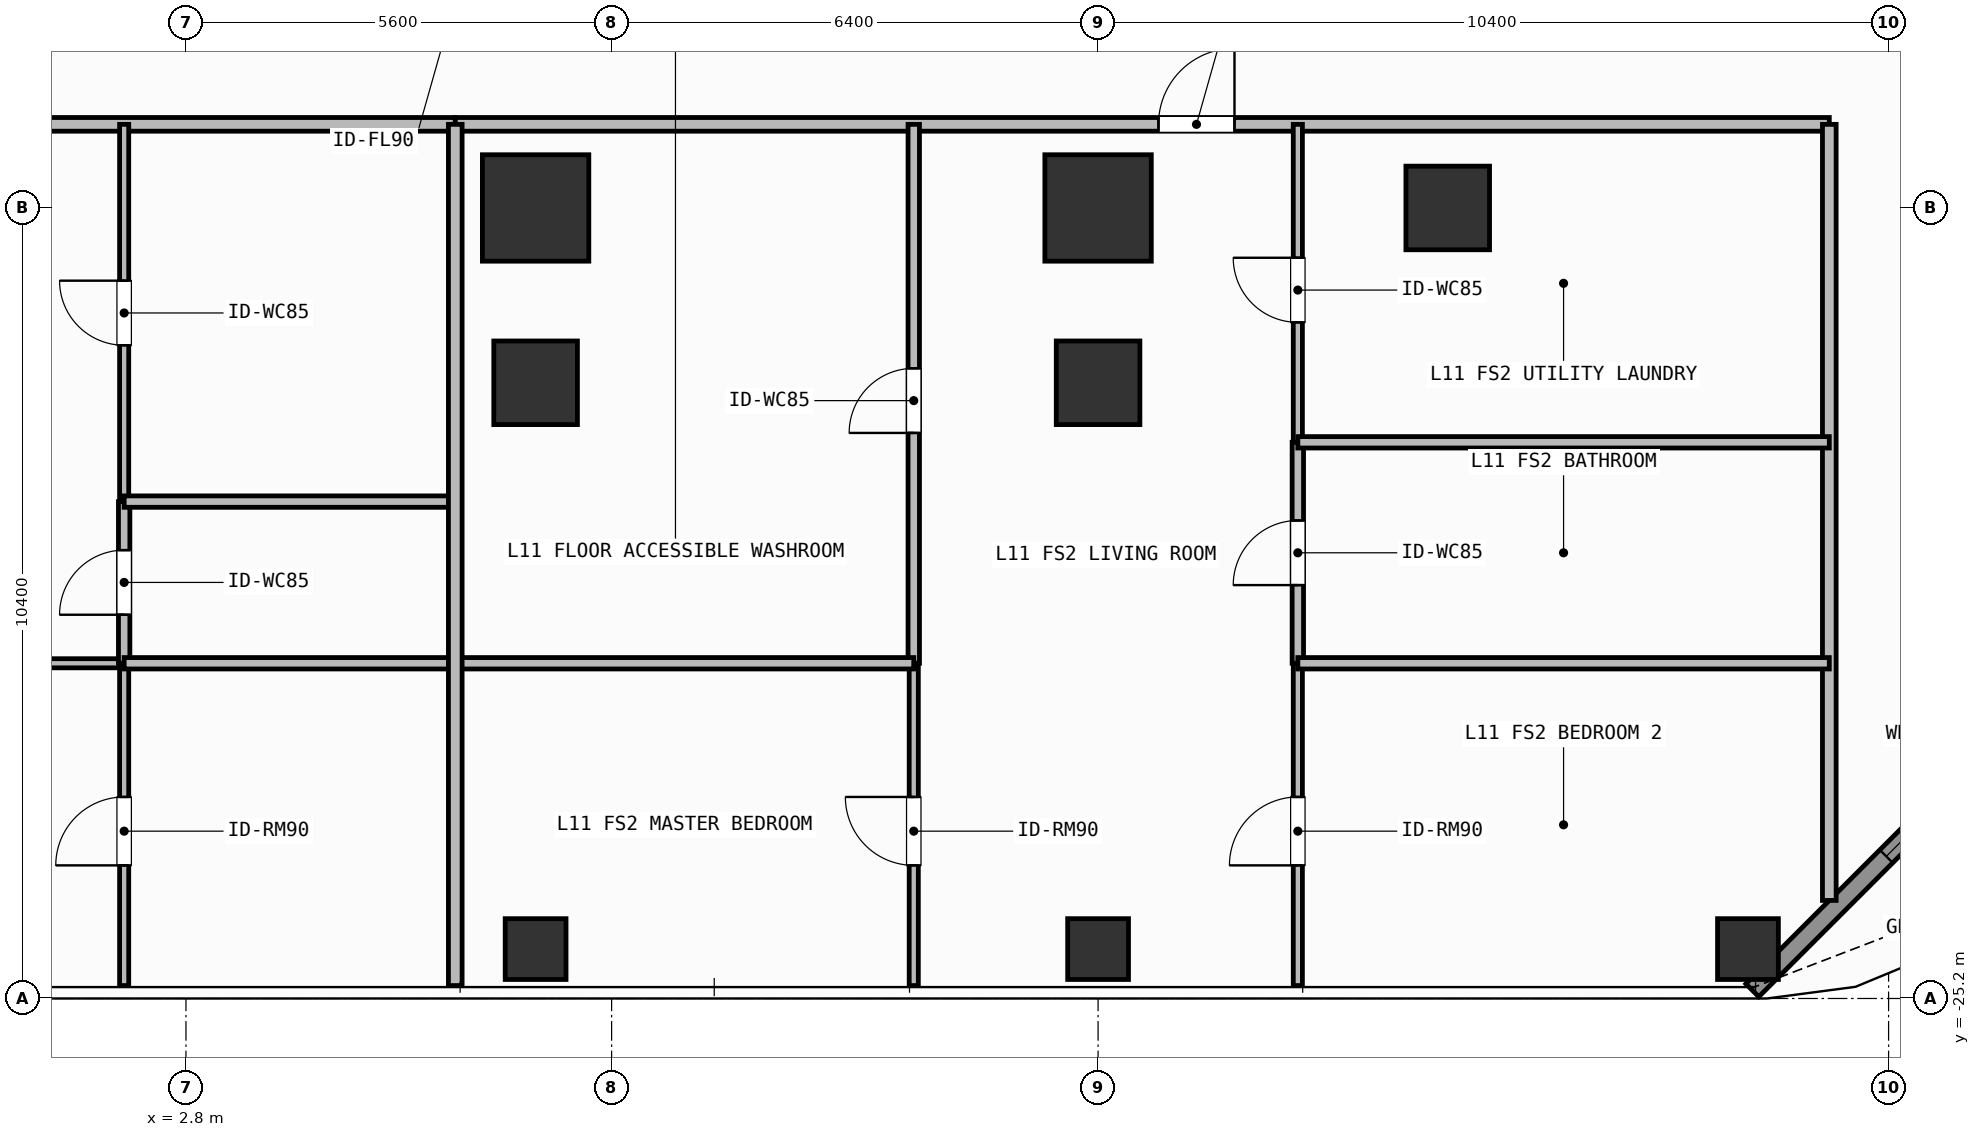
"""IFC4 building model, lengths in metres.
Left out: names, types, materials, properties, quantities, classifications, styles, units other than length and angle.
Written with IfcOpenShell. Run it as: python <this file> out.ifc"""

import sys

from ifc_helpers import new_model, si_unit, direction, frame, frame_2d, origin, origin_2d, place, context, subcontext, project, spatial, rectangle, hollow_rectangle, extrude, element, fill, save


model = new_model("IFC4")
c1 = context("Model", 3, precision=1e-05, world=origin(), true_north=direction((0.0, 1.0)))
c2 = subcontext(c1, "Body", "Model", "MODEL_VIEW")
j1 = project(units=[si_unit("LENGTHUNIT", "METRE"), si_unit("PLANEANGLEUNIT", "RADIAN")], contexts=[c1])
p1 = place(None, origin())
s1 = spatial("IfcSite", under=j1, at=p1, CompositionType="ELEMENT")
p2 = place(p1, origin())
s2 = spatial("IfcBuilding", under=s1, at=p2, CompositionType="ELEMENT")
p3 = place(p2, frame((0.0, 0.0, 42.3)))
s3 = spatial("IfcBuildingStorey", under=s2, at=p3, CompositionType="ELEMENT", Elevation=42.3)
for number, where, z_axis, x_axis in (
    (1, (7.4, -14.8, 0.0), (0.0, 0.0, 1.0), (1.0, 0.0, 0.0)),
    (2, (14.8, -14.8, 0.0), (0.0, 0.0, 1.0), (1.0, 0.0, 0.0)),
):
    element("IfcColumn", number, at=place(p3, frame(where, z_axis=z_axis, x_axis=x_axis)), inside=s3, PredefinedType="COLUMN", context=c2, shape_type="SweptSolid", body=[
        extrude(rectangle(XDim=1.4, YDim=1.4, at=origin_2d()), origin(), (0.0, 0.0, 1.0), 3.9),
    ])
for number, where, z_axis, x_axis in (
    (3, (19.4, -14.8, 0.0), (0.0, 0.0, 1.0), (1.0, 0.0, 0.0)),
    (4, (7.4, -17.1, 0.0), (0.0, 0.0, 1.0), (1.0, 0.0, 0.0)),
    (5, (14.8, -17.1, 0.0), (0.0, 0.0, 1.0), (1.0, 0.0, 0.0)),
):
    element("IfcColumn", number, at=place(p3, frame(where, z_axis=z_axis, x_axis=x_axis)), inside=s3, PredefinedType="COLUMN", context=c2, shape_type="SweptSolid", body=[
        extrude(rectangle(XDim=1.1, YDim=1.1, at=origin_2d()), origin(), (0.0, 0.0, 1.0), 3.9),
    ])
for number, where, z_axis, x_axis in (
    (6, (23.35, -24.55, 0.0), (0.0, 0.0, 1.0), (1.0, 0.0, 0.0)),
    (7, (7.4, -24.55, 0.0), (0.0, 0.0, 1.0), (1.0, 0.0, 0.0)),
    (8, (14.8, -24.55, 0.0), (0.0, 0.0, 1.0), (1.0, 0.0, 0.0)),
):
    element("IfcColumn", number, at=place(p3, frame(where, z_axis=z_axis, x_axis=x_axis)), inside=s3, PredefinedType="COLUMN", context=c2, shape_type="SweptSolid", body=[
        extrude(hollow_rectangle(XDim=0.8, YDim=0.8, WallThickness=0.036, at=origin_2d()), origin(), (0.0, 0.0, 1.0), 3.9),
    ])
p4 = place(p3, frame((27.992, -20.508, 0.0), z_axis=(0.0, 0.0, 1.0), x_axis=(-0.707106781187, -0.707106781187, 0.0)))
e9 = element("IfcWall", 9, at=p4, inside=s3, PredefinedType="SOLIDWALL", context=c2, shape_type="SweptSolid", body=[
    extrude(rectangle(XDim=6.484, YDim=0.24, at=frame_2d((3.242, 0.0))), origin(), (0.0, 0.0, 1.0), 3.68),
])
p5 = place(p4, frame((2.492, 0.0, 0.8)))
e10 = element("IfcOpeningElement", 10, at=p5, cuts=e9, PredefinedType="OPENING", context=c2, shape_type="SweptSolid", body=[
    extrude(rectangle(XDim=1.5, YDim=1.85, at=frame_2d((0.75, 0.925))), frame((0.0, 0.13, 0.0), z_axis=(0.0, -1.0, 0.0), x_axis=(1.0, 0.0, 0.0)), (0.0, 0.0, 1.0), 0.26),
])
p6 = place(p3, frame((-18.62, -13.7, 0.0), z_axis=(0.0, 0.0, 1.0), x_axis=(1.0, 0.0, 0.0)))
e11 = element("IfcWall", 11, at=p6, inside=s3, PredefinedType="PARTITIONING", context=c2, shape_type="SweptSolid", body=[
    extrude(rectangle(XDim=24.963, YDim=0.18, at=frame_2d((12.481, 0.0))), origin(), (0.0, 0.0, 1.0), 3.68),
])
p7 = place(p6, frame((11.981, 0.0, 0.0)))
e12 = element("IfcOpeningElement", 12, at=p7, cuts=e11, PredefinedType="OPENING", context=c2, shape_type="SweptSolid", body=[
    extrude(rectangle(XDim=1.0, YDim=2.2, at=frame_2d((0.5, 1.1))), frame((0.0, 0.1, 0.0), z_axis=(0.0, -1.0, 0.0), x_axis=(1.0, 0.0, 0.0)), (0.0, 0.0, 1.0), 0.2),
])
p8 = place(p3, frame((-5.425, -20.79, 0.0), z_axis=(0.0, 0.0, 1.0), x_axis=(1.0, 0.0, 0.0)))
e13 = element("IfcWall", 13, at=p8, inside=s3, PredefinedType="PARTITIONING", context=c2, shape_type="SweptSolid", body=[
    extrude(rectangle(XDim=7.412, YDim=0.12, at=frame_2d((3.706, 0.0))), origin(), (0.0, 0.0, 1.0), 3.68),
])
p9 = place(p8, frame((3.344, 0.0, 0.0)))
e14 = element("IfcOpeningElement", 14, at=p9, cuts=e13, PredefinedType="OPENING", context=c2, shape_type="SweptSolid", body=[
    extrude(rectangle(XDim=0.9, YDim=2.1, at=frame_2d((0.45, 1.05))), frame((0.0, 0.07, 0.0), z_axis=(0.0, -1.0, 0.0), x_axis=(1.0, 0.0, 0.0)), (0.0, 0.0, 1.0), 0.14),
])
p10 = place(p3, frame((1.987, -20.79, 0.0), z_axis=(0.0, 0.0, 1.0), x_axis=(0.0, 1.0, 0.0)))
e15 = element("IfcWall", 15, at=p10, inside=s3, PredefinedType="PARTITIONING", context=c2, shape_type="SweptSolid", body=[
    extrude(rectangle(XDim=2.127, YDim=0.15, at=frame_2d((1.063, 0.0))), origin(), (0.0, 0.0, 1.0), 3.68),
])
p11 = place(p10, frame((0.638, 0.0, 0.0)))
e16 = element("IfcOpeningElement", 16, at=p11, cuts=e15, PredefinedType="OPENING", context=c2, shape_type="SweptSolid", body=[
    extrude(rectangle(XDim=0.85, YDim=2.1, at=frame_2d((0.425, 1.05))), frame((0.0, 0.085, 0.0), z_axis=(0.0, -1.0, 0.0), x_axis=(1.0, 0.0, 0.0)), (0.0, 0.0, 1.0), 0.17),
])
p12 = place(p3, frame((1.987, -18.663, 0.0), z_axis=(0.0, 0.0, 1.0), x_axis=(0.0, 1.0, 0.0)))
e17 = element("IfcWall", 17, at=p12, inside=s3, PredefinedType="PARTITIONING", context=c2, shape_type="SweptSolid", body=[
    extrude(rectangle(XDim=4.963, YDim=0.12, at=frame_2d((2.481, 0.0))), origin(), (0.0, 0.0, 1.0), 3.68),
])
p13 = place(p12, frame((2.056, 0.0, 0.0)))
e18 = element("IfcOpeningElement", 18, at=p13, cuts=e17, PredefinedType="OPENING", context=c2, shape_type="SweptSolid", body=[
    extrude(rectangle(XDim=0.85, YDim=2.1, at=frame_2d((0.425, 1.05))), frame((0.0, 0.07, 0.0), z_axis=(0.0, -1.0, 0.0), x_axis=(1.0, 0.0, 0.0)), (0.0, 0.0, 1.0), 0.14),
])
p14 = place(p3, frame((1.987, -25.03, 0.0), z_axis=(0.0, 0.0, 1.0), x_axis=(0.0, 1.0, 0.0)))
e19 = element("IfcWall", 19, at=p14, inside=s3, PredefinedType="PARTITIONING", context=c2, shape_type="SweptSolid", body=[
    extrude(rectangle(XDim=4.24, YDim=0.12, at=frame_2d((2.12, 0.0))), origin(), (0.0, 0.0, 1.0), 3.68),
])
p15 = place(p14, frame((1.581, 0.0, 0.0)))
e20 = element("IfcOpeningElement", 20, at=p15, cuts=e19, PredefinedType="OPENING", context=c2, shape_type="SweptSolid", body=[
    extrude(rectangle(XDim=0.9, YDim=2.1, at=frame_2d((0.45, 1.05))), frame((0.0, 0.07, 0.0), z_axis=(0.0, -1.0, 0.0), x_axis=(1.0, 0.0, 0.0)), (0.0, 0.0, 1.0), 0.14),
])
p16 = place(p3, frame((6.343, -13.7, 0.0), z_axis=(0.0, 0.0, 1.0), x_axis=(1.0, 0.0, 0.0)))
e21 = element("IfcWall", 21, at=p16, inside=s3, PredefinedType="PARTITIONING", context=c2, shape_type="SweptSolid", body=[
    extrude(rectangle(XDim=18.077, YDim=0.18, at=frame_2d((9.039, 0.0))), origin(), (0.0, 0.0, 1.0), 3.68),
])
p17 = place(p16, frame((9.252, 0.0, 0.0)))
e22 = element("IfcOpeningElement", 22, at=p17, cuts=e21, PredefinedType="OPENING", context=c2, shape_type="SweptSolid", body=[
    extrude(rectangle(XDim=1.0, YDim=2.2, at=frame_2d((0.5, 1.1))), frame((0.0, 0.1, 0.0), z_axis=(0.0, -1.0, 0.0), x_axis=(1.0, 0.0, 0.0)), (0.0, 0.0, 1.0), 0.2),
])
p18 = place(p3, frame((12.375, -20.79, 0.0), z_axis=(0.0, 0.0, 1.0), x_axis=(0.0, 1.0, 0.0)))
e23 = element("IfcWall", 23, at=p18, inside=s3, PredefinedType="PARTITIONING", context=c2, shape_type="SweptSolid", body=[
    extrude(rectangle(XDim=7.09, YDim=0.15, at=frame_2d((3.545, 0.0))), origin(), (0.0, 0.0, 1.0), 3.68),
])
p19 = place(p18, frame((3.03, 0.0, 0.0)))
e24 = element("IfcOpeningElement", 24, at=p19, cuts=e23, PredefinedType="OPENING", context=c2, shape_type="SweptSolid", body=[
    extrude(rectangle(XDim=0.85, YDim=2.1, at=frame_2d((0.425, 1.05))), frame((0.0, 0.085, 0.0), z_axis=(0.0, -1.0, 0.0), x_axis=(1.0, 0.0, 0.0)), (0.0, 0.0, 1.0), 0.17),
])
p20 = place(p3, frame((12.375, -25.03, 0.0), z_axis=(0.0, 0.0, 1.0), x_axis=(0.0, 1.0, 0.0)))
e25 = element("IfcWall", 25, at=p20, inside=s3, PredefinedType="PARTITIONING", context=c2, shape_type="SweptSolid", body=[
    extrude(rectangle(XDim=4.24, YDim=0.12, at=frame_2d((2.12, 0.0))), origin(), (0.0, 0.0, 1.0), 3.68),
])
p21 = place(p20, frame((1.581, 0.0, 0.0)))
e26 = element("IfcOpeningElement", 26, at=p21, cuts=e25, PredefinedType="OPENING", context=c2, shape_type="SweptSolid", body=[
    extrude(rectangle(XDim=0.9, YDim=2.1, at=frame_2d((0.45, 1.05))), frame((0.0, 0.07, 0.0), z_axis=(0.0, -1.0, 0.0), x_axis=(1.0, 0.0, 0.0)), (0.0, 0.0, 1.0), 0.14),
])
p22 = place(p3, frame((17.428, -20.79, 0.0), z_axis=(0.0, 0.0, 1.0), x_axis=(0.0, 1.0, 0.0)))
e27 = element("IfcWall", 27, at=p22, inside=s3, PredefinedType="PARTITIONING", context=c2, shape_type="SweptSolid", body=[
    extrude(rectangle(XDim=2.907, YDim=0.15, at=frame_2d((1.454, 0.0))), origin(), (0.0, 0.0, 1.0), 3.68),
])
p23 = place(p22, frame((1.029, 0.0, 0.0)))
e28 = element("IfcOpeningElement", 28, at=p23, cuts=e27, PredefinedType="OPENING", context=c2, shape_type="SweptSolid", body=[
    extrude(rectangle(XDim=0.85, YDim=2.1, at=frame_2d((0.425, 1.05))), frame((0.0, 0.085, 0.0), z_axis=(0.0, -1.0, 0.0), x_axis=(1.0, 0.0, 0.0)), (0.0, 0.0, 1.0), 0.17),
])
p24 = place(p3, frame((17.428, -17.883, 0.0), z_axis=(0.0, 0.0, 1.0), x_axis=(0.0, 1.0, 0.0)))
e29 = element("IfcWall", 29, at=p24, inside=s3, PredefinedType="PARTITIONING", context=c2, shape_type="SweptSolid", body=[
    extrude(rectangle(XDim=4.183, YDim=0.12, at=frame_2d((2.092, 0.0))), origin(), (0.0, 0.0, 1.0), 3.68),
])
p25 = place(p24, frame((1.578, 0.0, 0.0)))
e30 = element("IfcOpeningElement", 30, at=p25, cuts=e29, PredefinedType="OPENING", context=c2, shape_type="SweptSolid", body=[
    extrude(rectangle(XDim=0.85, YDim=2.1, at=frame_2d((0.425, 1.05))), frame((0.0, 0.07, 0.0), z_axis=(0.0, -1.0, 0.0), x_axis=(1.0, 0.0, 0.0)), (0.0, 0.0, 1.0), 0.14),
])
p26 = place(p3, frame((17.428, -25.03, 0.0), z_axis=(0.0, 0.0, 1.0), x_axis=(0.0, 1.0, 0.0)))
e31 = element("IfcWall", 31, at=p26, inside=s3, PredefinedType="PARTITIONING", context=c2, shape_type="SweptSolid", body=[
    extrude(rectangle(XDim=4.24, YDim=0.12, at=frame_2d((2.12, 0.0))), origin(), (0.0, 0.0, 1.0), 3.68),
])
p27 = place(p26, frame((1.581, 0.0, 0.0)))
e32 = element("IfcOpeningElement", 32, at=p27, cuts=e31, PredefinedType="OPENING", context=c2, shape_type="SweptSolid", body=[
    extrude(rectangle(XDim=0.9, YDim=2.1, at=frame_2d((0.45, 1.05))), frame((0.0, 0.07, 0.0), z_axis=(0.0, -1.0, 0.0), x_axis=(1.0, 0.0, 0.0)), (0.0, 0.0, 1.0), 0.14),
])
p28 = place(p3, frame((24.42, -23.91, 0.0), z_axis=(0.0, 0.0, 1.0), x_axis=(0.0, 1.0, 0.0)))
e33 = element("IfcWall", 33, at=p28, inside=s3, PredefinedType="PARTITIONING", context=c2, shape_type="SweptSolid", body=[
    extrude(rectangle(XDim=10.21, YDim=0.18, at=frame_2d((5.105, 0.0))), origin(), (0.0, 0.0, 1.0), 3.68),
])
for number, where, z_axis, x_axis in (
    (34, (1.987, -18.663, 0.0), (0.0, 0.0, 1.0), (1.0, 0.0, 0.0)),
    (35, (1.987, -20.79, 0.0), (0.0, 0.0, 1.0), (1.0, 0.0, 0.0)),
):
    element("IfcWall", number, at=place(p3, frame(where, z_axis=z_axis, x_axis=x_axis)), inside=s3, PredefinedType="PARTITIONING", context=c2, shape_type="SweptSolid", body=[
        extrude(rectangle(XDim=4.356, YDim=0.15, at=frame_2d((2.178, 0.0))), origin(), (0.0, 0.0, 1.0), 3.68),
    ])
p29 = place(p3, frame((6.343, -20.79, 0.0), z_axis=(0.0, 0.0, 1.0), x_axis=(1.0, 0.0, 0.0)))
e36 = element("IfcWall", 36, at=p29, inside=s3, PredefinedType="PARTITIONING", context=c2, shape_type="SweptSolid", body=[
    extrude(rectangle(XDim=6.032, YDim=0.15, at=frame_2d((3.016, 0.0))), origin(), (0.0, 0.0, 1.0), 3.68),
])
for number, where, z_axis, x_axis in (
    (37, (17.428, -17.883, 0.0), (0.0, 0.0, 1.0), (1.0, 0.0, 0.0)),
    (38, (17.428, -20.79, 0.0), (0.0, 0.0, 1.0), (1.0, 0.0, 0.0)),
):
    element("IfcWall", number, at=place(p3, frame(where, z_axis=z_axis, x_axis=x_axis)), inside=s3, PredefinedType="PARTITIONING", context=c2, shape_type="SweptSolid", body=[
        extrude(rectangle(XDim=6.992, YDim=0.15, at=frame_2d((3.496, 0.0))), origin(), (0.0, 0.0, 1.0), 3.68),
    ])
p30 = place(p3, frame((6.343, -25.03, 0.0), z_axis=(0.0, 0.0, 1.0), x_axis=(0.0, 1.0, 0.0)))
e39 = element("IfcWall", 39, at=p30, inside=s3, PredefinedType="PARTITIONING", context=c2, shape_type="SweptSolid", body=[
    extrude(rectangle(XDim=11.33, YDim=0.18, at=frame_2d((5.665, 0.0))), origin(), (0.0, 0.0, 1.0), 3.68),
])
p31 = place(p5, origin())
e40 = element("IfcWindow", 40, at=p31, inside=s3, PartitioningType="SINGLE_PANEL", PredefinedType="WINDOW", context=c2, shape_type="SweptSolid", body=[
    extrude(rectangle(XDim=1.5, YDim=1.85, at=frame_2d((0.75, 0.925))), frame((0.0, 0.03, 0.0), z_axis=(0.0, -1.0, 0.0), x_axis=(1.0, 0.0, 0.0)), (0.0, 0.0, 1.0), 0.06),
])
fill(e10, e40)
p32 = place(p11, origin())
e41 = element("IfcDoor", 41, at=p32, inside=s3, OperationType="SINGLE_SWING_LEFT", PredefinedType="DOOR", context=c2, shape_type="SweptSolid", body=[
    extrude(rectangle(XDim=0.85, YDim=2.1, at=frame_2d((0.425, 1.05))), frame((0.0, 0.025, 0.0), z_axis=(0.0, -1.0, 0.0), x_axis=(1.0, 0.0, 0.0)), (0.0, 0.0, 1.0), 0.05),
])
fill(e16, e41)
p33 = place(p13, origin())
e42 = element("IfcDoor", 42, at=p33, inside=s3, OperationType="SINGLE_SWING_RIGHT", PredefinedType="DOOR", context=c2, shape_type="SweptSolid", body=[
    extrude(rectangle(XDim=0.85, YDim=2.1, at=frame_2d((0.425, 1.05))), frame((0.0, 0.025, 0.0), z_axis=(0.0, -1.0, 0.0), x_axis=(1.0, 0.0, 0.0)), (0.0, 0.0, 1.0), 0.05),
])
fill(e18, e42)
p34 = place(p15, origin())
e43 = element("IfcDoor", 43, at=p34, inside=s3, OperationType="SINGLE_SWING_LEFT", PredefinedType="DOOR", context=c2, shape_type="SweptSolid", body=[
    extrude(rectangle(XDim=0.9, YDim=2.1, at=frame_2d((0.45, 1.05))), frame((0.0, 0.025, 0.0), z_axis=(0.0, -1.0, 0.0), x_axis=(1.0, 0.0, 0.0)), (0.0, 0.0, 1.0), 0.05),
])
fill(e20, e43)
p35 = place(p17, origin())
e44 = element("IfcDoor", 44, at=p35, inside=s3, OperationType="SINGLE_SWING_RIGHT", PredefinedType="DOOR", context=c2, shape_type="SweptSolid", body=[
    extrude(rectangle(XDim=1.0, YDim=2.2, at=frame_2d((0.5, 1.1))), frame((0.0, 0.025, 0.0), z_axis=(0.0, -1.0, 0.0), x_axis=(1.0, 0.0, 0.0)), (0.0, 0.0, 1.0), 0.05),
])
fill(e22, e44)
p36 = place(p19, origin())
e45 = element("IfcDoor", 45, at=p36, inside=s3, OperationType="SINGLE_SWING_LEFT", PredefinedType="DOOR", context=c2, shape_type="SweptSolid", body=[
    extrude(rectangle(XDim=0.85, YDim=2.1, at=frame_2d((0.425, 1.05))), frame((0.0, 0.025, 0.0), z_axis=(0.0, -1.0, 0.0), x_axis=(1.0, 0.0, 0.0)), (0.0, 0.0, 1.0), 0.05),
])
fill(e24, e45)
p37 = place(p21, origin())
e46 = element("IfcDoor", 46, at=p37, inside=s3, OperationType="SINGLE_SWING_RIGHT", PredefinedType="DOOR", context=c2, shape_type="SweptSolid", body=[
    extrude(rectangle(XDim=0.9, YDim=2.1, at=frame_2d((0.45, 1.05))), frame((0.0, 0.025, 0.0), z_axis=(0.0, -1.0, 0.0), x_axis=(1.0, 0.0, 0.0)), (0.0, 0.0, 1.0), 0.05),
])
fill(e26, e46)
p38 = place(p23, origin())
e47 = element("IfcDoor", 47, at=p38, inside=s3, OperationType="SINGLE_SWING_LEFT", PredefinedType="DOOR", context=c2, shape_type="SweptSolid", body=[
    extrude(rectangle(XDim=0.85, YDim=2.1, at=frame_2d((0.425, 1.05))), frame((0.0, 0.025, 0.0), z_axis=(0.0, -1.0, 0.0), x_axis=(1.0, 0.0, 0.0)), (0.0, 0.0, 1.0), 0.05),
])
fill(e28, e47)
p39 = place(p25, origin())
e48 = element("IfcDoor", 48, at=p39, inside=s3, OperationType="SINGLE_SWING_RIGHT", PredefinedType="DOOR", context=c2, shape_type="SweptSolid", body=[
    extrude(rectangle(XDim=0.85, YDim=2.1, at=frame_2d((0.425, 1.05))), frame((0.0, 0.025, 0.0), z_axis=(0.0, -1.0, 0.0), x_axis=(1.0, 0.0, 0.0)), (0.0, 0.0, 1.0), 0.05),
])
fill(e30, e48)
p40 = place(p27, origin())
e49 = element("IfcDoor", 49, at=p40, inside=s3, OperationType="SINGLE_SWING_LEFT", PredefinedType="DOOR", context=c2, shape_type="SweptSolid", body=[
    extrude(rectangle(XDim=0.9, YDim=2.1, at=frame_2d((0.45, 1.05))), frame((0.0, 0.025, 0.0), z_axis=(0.0, -1.0, 0.0), x_axis=(1.0, 0.0, 0.0)), (0.0, 0.0, 1.0), 0.05),
])
fill(e32, e49)
save(model, sys.argv[1])
